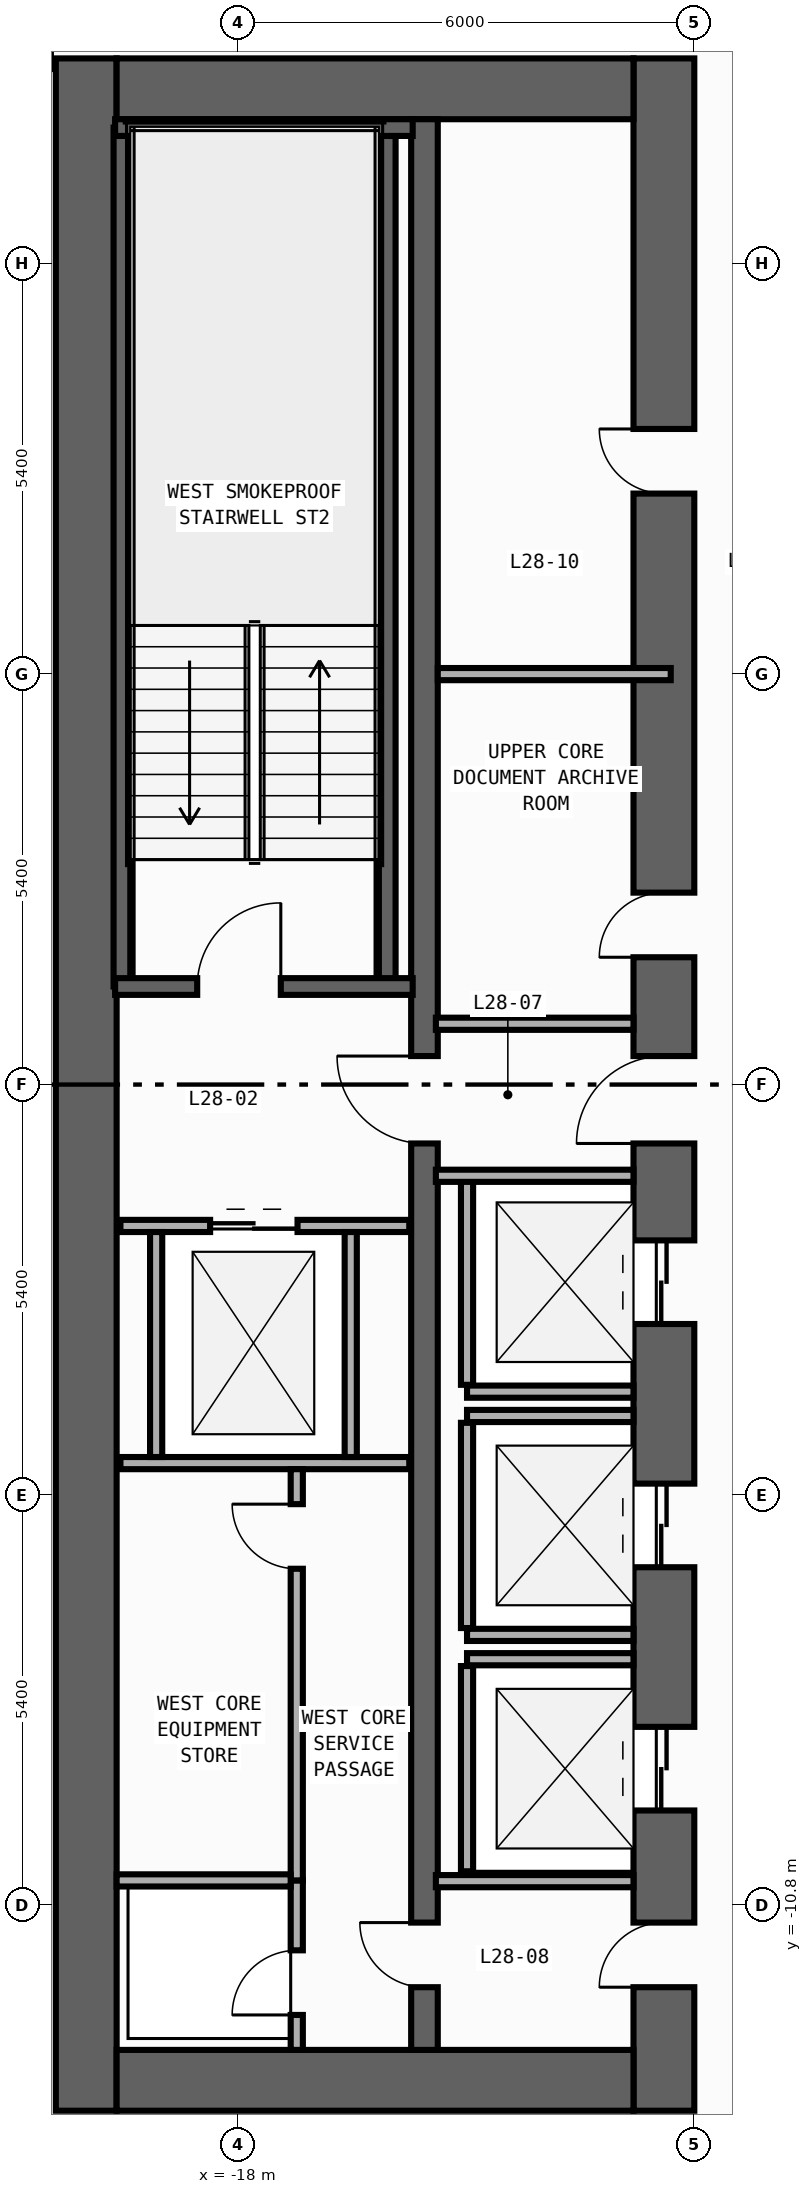
"""IFC4 building model, lengths in metres.
Left out: names, types, materials, properties, quantities, classifications, styles, units other than length and angle.
Written with IfcOpenShell. Run it as: python <this file> out.ifc"""

import sys

from ifc_helpers import new_model, si_unit, direction, frame, frame_2d, origin, place, context, subcontext, project, spatial, rectangle, extrude, element, fill, save


model = new_model("IFC4")
c1 = context("Model", 3, precision=1e-05, world=origin(), true_north=direction((0.0, 1.0)))
c2 = subcontext(c1, "Body", "Model", "MODEL_VIEW")
j1 = project(units=[si_unit("LENGTHUNIT", "METRE"), si_unit("PLANEANGLEUNIT", "RADIAN")], contexts=[c1])
p1 = place(None, origin())
s1 = spatial("IfcSite", under=j1, at=p1, CompositionType="ELEMENT")
p2 = place(p1, origin())
s2 = spatial("IfcBuilding", under=s1, at=p2, CompositionType="ELEMENT")
p3 = place(p2, frame((0.0, 0.0, 122.6)))
s3 = spatial("IfcBuildingStorey", under=s2, at=p3, CompositionType="ELEMENT", Elevation=122.6)
p4 = place(p3, frame((-20.0, -13.5, 0.0), z_axis=(0.0, 0.0, 1.0), x_axis=(0.0, 1.0, 0.0)))
e1 = element("IfcWall", 1, at=p4, inside=s3, PredefinedType="SHEAR", context=c2, shape_type="SweptSolid", body=[
    extrude(rectangle(XDim=27.0, YDim=0.8, at=frame_2d((13.5, 0.0))), origin(), (0.0, 0.0, 1.0), 3.94),
])
p5 = place(p3, frame((-12.4, -13.5, 0.0), z_axis=(0.0, 0.0, 1.0), x_axis=(0.0, 1.0, 0.0)))
e2 = element("IfcWall", 2, at=p5, inside=s3, PredefinedType="SHEAR", context=c2, shape_type="SweptSolid", body=[
    extrude(rectangle(XDim=27.0, YDim=0.8, at=frame_2d((13.5, 0.0))), origin(), (0.0, 0.0, 1.0), 3.94),
])
p6 = place(p5, frame((10.35, 0.0, 0.0)))
e3 = element("IfcOpeningElement", 3, at=p6, cuts=e2, PredefinedType="OPENING", context=c2, shape_type="SweptSolid", body=[
    extrude(rectangle(XDim=1.1, YDim=2.2, at=frame_2d((0.55, 1.1))), frame((0.0, 0.41, 0.0), z_axis=(0.0, -1.0, 0.0), x_axis=(1.0, 0.0, 0.0)), (0.0, 0.0, 1.0), 0.82),
])
p7 = place(p5, frame((7.15, 0.0, 0.0)))
e4 = element("IfcOpeningElement", 4, at=p7, cuts=e2, PredefinedType="OPENING", context=c2, shape_type="SweptSolid", body=[
    extrude(rectangle(XDim=1.1, YDim=2.2, at=frame_2d((0.55, 1.1))), frame((0.0, 0.41, 0.0), z_axis=(0.0, -1.0, 0.0), x_axis=(1.0, 0.0, 0.0)), (0.0, 0.0, 1.0), 0.82),
])
p8 = place(p5, frame((3.95, 0.0, 0.0)))
e5 = element("IfcOpeningElement", 5, at=p8, cuts=e2, PredefinedType="OPENING", context=c2, shape_type="SweptSolid", body=[
    extrude(rectangle(XDim=1.1, YDim=2.2, at=frame_2d((0.55, 1.1))), frame((0.0, 0.41, 0.0), z_axis=(0.0, -1.0, 0.0), x_axis=(1.0, 0.0, 0.0)), (0.0, 0.0, 1.0), 0.82),
])
p9 = place(p5, frame((15.175, 0.0, 0.0)))
e6 = element("IfcOpeningElement", 6, at=p9, cuts=e2, PredefinedType="OPENING", context=c2, shape_type="SweptSolid", body=[
    extrude(rectangle(XDim=0.85, YDim=2.1, at=frame_2d((0.425, 1.05))), frame((0.0, 0.41, 0.0), z_axis=(0.0, -1.0, 0.0), x_axis=(1.0, 0.0, 0.0)), (0.0, 0.0, 1.0), 0.82),
])
p10 = place(p5, frame((21.275, 0.0, 0.0)))
e7 = element("IfcOpeningElement", 7, at=p10, cuts=e2, PredefinedType="OPENING", context=c2, shape_type="SweptSolid", body=[
    extrude(rectangle(XDim=0.85, YDim=2.1, at=frame_2d((0.425, 1.05))), frame((0.0, 0.41, 0.0), z_axis=(0.0, -1.0, 0.0), x_axis=(1.0, 0.0, 0.0)), (0.0, 0.0, 1.0), 0.82),
])
p11 = place(p5, frame((12.725, 0.0, 0.0)))
e8 = element("IfcOpeningElement", 8, at=p11, cuts=e2, PredefinedType="OPENING", context=c2, shape_type="SweptSolid", body=[
    extrude(rectangle(XDim=1.15, YDim=2.2, at=frame_2d((0.575, 1.1))), frame((0.0, 0.41, 0.0), z_axis=(0.0, -1.0, 0.0), x_axis=(1.0, 0.0, 0.0)), (0.0, 0.0, 1.0), 0.82),
])
p12 = place(p5, frame((1.625, 0.0, 0.0)))
e9 = element("IfcOpeningElement", 9, at=p12, cuts=e2, PredefinedType="OPENING", context=c2, shape_type="SweptSolid", body=[
    extrude(rectangle(XDim=0.85, YDim=2.1, at=frame_2d((0.425, 1.05))), frame((0.0, 0.41, 0.0), z_axis=(0.0, -1.0, 0.0), x_axis=(1.0, 0.0, 0.0)), (0.0, 0.0, 1.0), 0.82),
])
for number, where, z_axis, x_axis in (
    (10, (-19.6, -13.1, 0.0), (0.0, 0.0, 1.0), (1.0, 0.0, 0.0)),
    (11, (-19.6, 13.1, 0.0), (0.0, 0.0, 1.0), (1.0, 0.0, 0.0)),
):
    element("IfcWall", number, at=place(p3, frame(where, z_axis=z_axis, x_axis=x_axis)), inside=s3, PredefinedType="SHEAR", context=c2, shape_type="SweptSolid", body=[
        extrude(rectangle(XDim=6.8, YDim=0.8, at=frame_2d((3.4, 0.0))), origin(), (0.0, 0.0, 1.0), 3.94),
    ])
p13 = place(p3, frame((-15.55, -12.7, 0.0), z_axis=(0.0, 0.0, 1.0), x_axis=(0.0, 1.0, 0.0)))
e12 = element("IfcWall", 12, at=p13, inside=s3, PredefinedType="SHEAR", context=c2, shape_type="SweptSolid", body=[
    extrude(rectangle(XDim=25.4, YDim=0.35, at=frame_2d((12.7, 0.0))), origin(), (0.0, 0.0, 1.0), 3.94),
])
p14 = place(p13, frame((11.925, 0.0, 0.0)))
e13 = element("IfcOpeningElement", 13, at=p14, cuts=e12, PredefinedType="OPENING", context=c2, shape_type="SweptSolid", body=[
    extrude(rectangle(XDim=1.15, YDim=2.2, at=frame_2d((0.575, 1.1))), frame((0.0, 0.185, 0.0), z_axis=(0.0, -1.0, 0.0), x_axis=(1.0, 0.0, 0.0)), (0.0, 0.0, 1.0), 0.37),
])
p15 = place(p13, frame((0.825, 0.0, 0.0)))
e14 = element("IfcOpeningElement", 14, at=p15, cuts=e12, PredefinedType="OPENING", context=c2, shape_type="SweptSolid", body=[
    extrude(rectangle(XDim=0.85, YDim=2.1, at=frame_2d((0.425, 1.05))), frame((0.0, 0.185, 0.0), z_axis=(0.0, -1.0, 0.0), x_axis=(1.0, 0.0, 0.0)), (0.0, 0.0, 1.0), 0.37),
])
for number, where, z_axis, x_axis in (
    (15, (-16.04, 1.29, 0.0), (0.0, 0.0, 1.0), (0.0, 1.0, 0.0)),
    (16, (-19.53, 1.29, 0.0), (0.0, 0.0, 1.0), (0.0, 1.0, 0.0)),
):
    element("IfcWall", number, at=place(p3, frame(where, z_axis=z_axis, x_axis=x_axis)), inside=s3, PredefinedType="SHEAR", context=c2, shape_type="SweptSolid", body=[
        extrude(rectangle(XDim=11.3, YDim=0.22, at=frame_2d((5.65, 0.0))), origin(), (0.0, 0.0, 1.0), 3.94),
    ])
p16 = place(p3, frame((-19.62, 12.59, 0.0), z_axis=(0.0, 0.0, 1.0), x_axis=(1.0, 0.0, 0.0)))
e17 = element("IfcWall", 17, at=p16, inside=s3, PredefinedType="SHEAR", context=c2, shape_type="SweptSolid", body=[
    extrude(rectangle(XDim=3.915, YDim=0.22, at=frame_2d((1.958, 0.0))), origin(), (0.0, 0.0, 1.0), 3.94),
])
p17 = place(p3, frame((-19.62, 1.29, 0.0), z_axis=(0.0, 0.0, 1.0), x_axis=(1.0, 0.0, 0.0)))
e18 = element("IfcWall", 18, at=p17, inside=s3, PredefinedType="SHEAR", context=c2, shape_type="SweptSolid", body=[
    extrude(rectangle(XDim=3.915, YDim=0.22, at=frame_2d((1.958, 0.0))), origin(), (0.0, 0.0, 1.0), 3.94),
])
p18 = place(p17, frame((1.08, 0.0, 0.0)))
e19 = element("IfcOpeningElement", 19, at=p18, cuts=e18, PredefinedType="OPENING", context=c2, shape_type="SweptSolid", body=[
    extrude(rectangle(XDim=1.1, YDim=2.2, at=frame_2d((0.55, 1.1))), frame((0.0, 0.12, 0.0), z_axis=(0.0, -1.0, 0.0), x_axis=(1.0, 0.0, 0.0)), (0.0, 0.0, 1.0), 0.24),
])
p19 = place(p3, frame((-14.99, -4.04, 0.0), z_axis=(0.0, 0.0, 1.0), x_axis=(1.0, 0.0, 0.0)))
e20 = element("IfcWall", 20, at=p19, inside=s3, PredefinedType="STANDARD", context=c2, shape_type="SweptSolid", body=[
    extrude(rectangle(XDim=2.19, YDim=0.16, at=frame_2d((1.095, 0.0))), origin(), (0.0, 0.0, 1.0), 3.94),
])
p20 = place(p3, frame((-14.99, -3.95, 0.0), z_axis=(0.0, 0.0, 1.0), x_axis=(0.0, 1.0, 0.0)))
e21 = element("IfcWall", 21, at=p20, inside=s3, PredefinedType="STANDARD", context=c2, shape_type="SweptSolid", body=[
    extrude(rectangle(XDim=2.7, YDim=0.16, at=frame_2d((1.35, 0.0))), origin(), (0.0, 0.0, 1.0), 3.94),
])
for number, where, z_axis, x_axis in (
    (22, (-14.99, -7.24, 0.0), (0.0, 0.0, 1.0), (1.0, 0.0, 0.0)),
    (23, (-14.99, -4.36, 0.0), (0.0, 0.0, 1.0), (1.0, 0.0, 0.0)),
):
    element("IfcWall", number, at=place(p3, frame(where, z_axis=z_axis, x_axis=x_axis)), inside=s3, PredefinedType="STANDARD", context=c2, shape_type="SweptSolid", body=[
        extrude(rectangle(XDim=2.19, YDim=0.16, at=frame_2d((1.095, 0.0))), origin(), (0.0, 0.0, 1.0), 3.94),
    ])
p21 = place(p3, frame((-14.99, -7.15, 0.0), z_axis=(0.0, 0.0, 1.0), x_axis=(0.0, 1.0, 0.0)))
e24 = element("IfcWall", 24, at=p21, inside=s3, PredefinedType="STANDARD", context=c2, shape_type="SweptSolid", body=[
    extrude(rectangle(XDim=2.7, YDim=0.16, at=frame_2d((1.35, 0.0))), origin(), (0.0, 0.0, 1.0), 3.94),
])
p22 = place(p3, frame((-14.99, -7.56, 0.0), z_axis=(0.0, 0.0, 1.0), x_axis=(1.0, 0.0, 0.0)))
e25 = element("IfcWall", 25, at=p22, inside=s3, PredefinedType="STANDARD", context=c2, shape_type="SweptSolid", body=[
    extrude(rectangle(XDim=2.19, YDim=0.16, at=frame_2d((1.095, 0.0))), origin(), (0.0, 0.0, 1.0), 3.94),
])
p23 = place(p3, frame((-14.99, -10.35, 0.0), z_axis=(0.0, 0.0, 1.0), x_axis=(0.0, 1.0, 0.0)))
e26 = element("IfcWall", 26, at=p23, inside=s3, PredefinedType="STANDARD", context=c2, shape_type="SweptSolid", body=[
    extrude(rectangle(XDim=2.7, YDim=0.16, at=frame_2d((1.35, 0.0))), origin(), (0.0, 0.0, 1.0), 3.94),
])
p24 = place(p3, frame((-19.55, -1.86, 0.0), z_axis=(0.0, 0.0, 1.0), x_axis=(1.0, 0.0, 0.0)))
e27 = element("IfcWall", 27, at=p24, inside=s3, PredefinedType="STANDARD", context=c2, shape_type="SweptSolid", body=[
    extrude(rectangle(XDim=3.8, YDim=0.16, at=frame_2d((1.9, 0.0))), origin(), (0.0, 0.0, 1.0), 3.94),
])
p25 = place(p24, frame((1.18, 0.0, 0.0)))
e28 = element("IfcOpeningElement", 28, at=p25, cuts=e27, PredefinedType="OPENING", context=c2, shape_type="SweptSolid", body=[
    extrude(rectangle(XDim=1.15, YDim=2.2, at=frame_2d((0.575, 1.1))), frame((0.0, 0.09, 0.0), z_axis=(0.0, -1.0, 0.0), x_axis=(1.0, 0.0, 0.0)), (0.0, 0.0, 1.0), 0.18),
])
p26 = place(p3, frame((-19.55, -4.98, 0.0), z_axis=(0.0, 0.0, 1.0), x_axis=(1.0, 0.0, 0.0)))
e29 = element("IfcWall", 29, at=p26, inside=s3, PredefinedType="STANDARD", context=c2, shape_type="SweptSolid", body=[
    extrude(rectangle(XDim=3.8, YDim=0.16, at=frame_2d((1.9, 0.0))), origin(), (0.0, 0.0, 1.0), 3.94),
])
for number, where, z_axis, x_axis in (
    (30, (-19.08, -4.9, 0.0), (0.0, 0.0, 1.0), (0.0, 1.0, 0.0)),
    (31, (-16.52, -4.9, 0.0), (0.0, 0.0, 1.0), (0.0, 1.0, 0.0)),
):
    element("IfcWall", number, at=place(p3, frame(where, z_axis=z_axis, x_axis=x_axis)), inside=s3, PredefinedType="STANDARD", context=c2, shape_type="SweptSolid", body=[
        extrude(rectangle(XDim=2.96, YDim=0.16, at=frame_2d((1.48, 0.0))), origin(), (0.0, 0.0, 1.0), 3.94),
    ])
for number, where, z_axis, x_axis in (
    (32, (-15.4, 0.8, 0.0), (0.0, 0.0, 1.0), (1.0, 0.0, 0.0)),
    (33, (-15.4, -1.2, 0.0), (0.0, 0.0, 1.0), (1.0, 0.0, 0.0)),
    (34, (-15.4, -10.48, 0.0), (0.0, 0.0, 1.0), (1.0, 0.0, 0.0)),
):
    element("IfcWall", number, at=place(p3, frame(where, z_axis=z_axis, x_axis=x_axis)), inside=s3, PredefinedType="STANDARD", context=c2, shape_type="SweptSolid", body=[
        extrude(rectangle(XDim=2.6, YDim=0.16, at=frame_2d((1.3, 0.0))), origin(), (0.0, 0.0, 1.0), 3.94),
    ])
p27 = place(p3, frame((-17.23, -12.7, 0.0), z_axis=(0.0, 0.0, 1.0), x_axis=(0.0, 1.0, 0.0)))
e35 = element("IfcWall", 35, at=p27, inside=s3, PredefinedType="PARTITIONING", context=c2, shape_type="SweptSolid", body=[
    extrude(rectangle(XDim=2.23, YDim=0.16, at=frame_2d((1.115, 0.0))), origin(), (0.0, 0.0, 1.0), 3.94),
])
p28 = place(p27, frame((0.46, 0.0, 0.0)))
e36 = element("IfcOpeningElement", 36, at=p28, cuts=e35, PredefinedType="OPENING", context=c2, shape_type="SweptSolid", body=[
    extrude(rectangle(XDim=0.85, YDim=2.1, at=frame_2d((0.425, 1.05))), frame((0.0, 0.09, 0.0), z_axis=(0.0, -1.0, 0.0), x_axis=(1.0, 0.0, 0.0)), (0.0, 0.0, 1.0), 0.18),
])
p29 = place(p3, frame((-17.23, -10.47, 0.0), z_axis=(0.0, 0.0, 1.0), x_axis=(0.0, 1.0, 0.0)))
e37 = element("IfcWall", 37, at=p29, inside=s3, PredefinedType="PARTITIONING", context=c2, shape_type="SweptSolid", body=[
    extrude(rectangle(XDim=5.41, YDim=0.16, at=frame_2d((2.705, 0.0))), origin(), (0.0, 0.0, 1.0), 3.94),
])
p30 = place(p29, frame((4.1, 0.0, 0.0)))
e38 = element("IfcOpeningElement", 38, at=p30, cuts=e37, PredefinedType="OPENING", context=c2, shape_type="SweptSolid", body=[
    extrude(rectangle(XDim=0.85, YDim=2.1, at=frame_2d((0.425, 1.05))), frame((0.0, 0.09, 0.0), z_axis=(0.0, -1.0, 0.0), x_axis=(1.0, 0.0, 0.0)), (0.0, 0.0, 1.0), 0.18),
])
p31 = place(p3, frame((-19.6, -10.47, 0.0), z_axis=(0.0, 0.0, 1.0), x_axis=(1.0, 0.0, 0.0)))
e39 = element("IfcWall", 39, at=p31, inside=s3, PredefinedType="PARTITIONING", context=c2, shape_type="SweptSolid", body=[
    extrude(rectangle(XDim=2.29, YDim=0.16, at=frame_2d((1.145, 0.0))), origin(), (0.0, 0.0, 1.0), 3.94),
])
p32 = place(p3, frame((-15.375, 5.4, 0.0), z_axis=(0.0, 0.0, 1.0), x_axis=(1.0, 0.0, 0.0)))
e40 = element("IfcWall", 40, at=p32, inside=s3, PredefinedType="PARTITIONING", context=c2, shape_type="SweptSolid", body=[
    extrude(rectangle(XDim=3.065, YDim=0.16, at=frame_2d((1.532, 0.0))), origin(), (0.0, 0.0, 1.0), 3.94),
])
p33 = place(p18, origin())
e41 = element("IfcDoor", 41, at=p33, inside=s3, OperationType="SINGLE_SWING_RIGHT", PredefinedType="DOOR", context=c2, shape_type="SweptSolid", body=[
    extrude(rectangle(XDim=1.1, YDim=2.2, at=frame_2d((0.55, 1.1))), frame((0.0, 0.025, 0.0), z_axis=(0.0, -1.0, 0.0), x_axis=(1.0, 0.0, 0.0)), (0.0, 0.0, 1.0), 0.05),
])
fill(e19, e41)
p34 = place(p6, origin())
e42 = element("IfcDoor", 42, at=p34, inside=s3, OperationType="DOUBLE_DOOR_SLIDING", PredefinedType="DOOR", context=c2, shape_type="SweptSolid", body=[
    extrude(rectangle(XDim=1.1, YDim=2.2, at=frame_2d((0.55, 1.1))), frame((0.0, 0.025, 0.0), z_axis=(0.0, -1.0, 0.0), x_axis=(1.0, 0.0, 0.0)), (0.0, 0.0, 1.0), 0.05),
])
fill(e3, e42)
p35 = place(p7, origin())
e43 = element("IfcDoor", 43, at=p35, inside=s3, OperationType="DOUBLE_DOOR_SLIDING", PredefinedType="DOOR", context=c2, shape_type="SweptSolid", body=[
    extrude(rectangle(XDim=1.1, YDim=2.2, at=frame_2d((0.55, 1.1))), frame((0.0, 0.025, 0.0), z_axis=(0.0, -1.0, 0.0), x_axis=(1.0, 0.0, 0.0)), (0.0, 0.0, 1.0), 0.05),
])
fill(e4, e43)
p36 = place(p8, origin())
e44 = element("IfcDoor", 44, at=p36, inside=s3, OperationType="DOUBLE_DOOR_SLIDING", PredefinedType="DOOR", context=c2, shape_type="SweptSolid", body=[
    extrude(rectangle(XDim=1.1, YDim=2.2, at=frame_2d((0.55, 1.1))), frame((0.0, 0.025, 0.0), z_axis=(0.0, -1.0, 0.0), x_axis=(1.0, 0.0, 0.0)), (0.0, 0.0, 1.0), 0.05),
])
fill(e5, e44)
p37 = place(p9, origin())
e45 = element("IfcDoor", 45, at=p37, inside=s3, OperationType="SINGLE_SWING_LEFT", PredefinedType="DOOR", context=c2, shape_type="SweptSolid", body=[
    extrude(rectangle(XDim=0.85, YDim=2.1, at=frame_2d((0.425, 1.05))), frame((0.0, 0.025, 0.0), z_axis=(0.0, -1.0, 0.0), x_axis=(1.0, 0.0, 0.0)), (0.0, 0.0, 1.0), 0.05),
])
fill(e6, e45)
p38 = place(p10, origin())
e46 = element("IfcDoor", 46, at=p38, inside=s3, OperationType="SINGLE_SWING_RIGHT", PredefinedType="DOOR", context=c2, shape_type="SweptSolid", body=[
    extrude(rectangle(XDim=0.85, YDim=2.1, at=frame_2d((0.425, 1.05))), frame((0.0, 0.025, 0.0), z_axis=(0.0, -1.0, 0.0), x_axis=(1.0, 0.0, 0.0)), (0.0, 0.0, 1.0), 0.05),
])
fill(e7, e46)
p39 = place(p11, origin())
e47 = element("IfcDoor", 47, at=p39, inside=s3, OperationType="SINGLE_SWING_LEFT", PredefinedType="DOOR", context=c2, shape_type="SweptSolid", body=[
    extrude(rectangle(XDim=1.15, YDim=2.2, at=frame_2d((0.575, 1.1))), frame((0.0, 0.025, 0.0), z_axis=(0.0, -1.0, 0.0), x_axis=(1.0, 0.0, 0.0)), (0.0, 0.0, 1.0), 0.05),
])
fill(e8, e47)
p40 = place(p14, origin())
e48 = element("IfcDoor", 48, at=p40, inside=s3, OperationType="SINGLE_SWING_RIGHT", PredefinedType="DOOR", context=c2, shape_type="SweptSolid", body=[
    extrude(rectangle(XDim=1.15, YDim=2.2, at=frame_2d((0.575, 1.1))), frame((0.0, 0.025, 0.0), z_axis=(0.0, -1.0, 0.0), x_axis=(1.0, 0.0, 0.0)), (0.0, 0.0, 1.0), 0.05),
])
fill(e13, e48)
p41 = place(p12, origin())
e49 = element("IfcDoor", 49, at=p41, inside=s3, OperationType="SINGLE_SWING_LEFT", PredefinedType="DOOR", context=c2, shape_type="SweptSolid", body=[
    extrude(rectangle(XDim=0.85, YDim=2.1, at=frame_2d((0.425, 1.05))), frame((0.0, 0.025, 0.0), z_axis=(0.0, -1.0, 0.0), x_axis=(1.0, 0.0, 0.0)), (0.0, 0.0, 1.0), 0.05),
])
fill(e9, e49)
p42 = place(p15, origin())
e50 = element("IfcDoor", 50, at=p42, inside=s3, OperationType="SINGLE_SWING_RIGHT", PredefinedType="DOOR", context=c2, shape_type="SweptSolid", body=[
    extrude(rectangle(XDim=0.85, YDim=2.1, at=frame_2d((0.425, 1.05))), frame((0.0, 0.025, 0.0), z_axis=(0.0, -1.0, 0.0), x_axis=(1.0, 0.0, 0.0)), (0.0, 0.0, 1.0), 0.05),
])
fill(e14, e50)
p43 = place(p25, origin())
e51 = element("IfcDoor", 51, at=p43, inside=s3, OperationType="DOUBLE_DOOR_SLIDING", PredefinedType="DOOR", context=c2, shape_type="SweptSolid", body=[
    extrude(rectangle(XDim=1.15, YDim=2.2, at=frame_2d((0.575, 1.1))), frame((0.0, 0.025, 0.0), z_axis=(0.0, -1.0, 0.0), x_axis=(1.0, 0.0, 0.0)), (0.0, 0.0, 1.0), 0.05),
])
fill(e28, e51)
p44 = place(p28, origin())
e52 = element("IfcDoor", 52, at=p44, inside=s3, OperationType="SINGLE_SWING_LEFT", PredefinedType="DOOR", context=c2, shape_type="SweptSolid", body=[
    extrude(rectangle(XDim=0.85, YDim=2.1, at=frame_2d((0.425, 1.05))), frame((0.0, 0.025, 0.0), z_axis=(0.0, -1.0, 0.0), x_axis=(1.0, 0.0, 0.0)), (0.0, 0.0, 1.0), 0.05),
])
fill(e36, e52)
p45 = place(p30, origin())
e53 = element("IfcDoor", 53, at=p45, inside=s3, OperationType="SINGLE_SWING_RIGHT", PredefinedType="DOOR", context=c2, shape_type="SweptSolid", body=[
    extrude(rectangle(XDim=0.85, YDim=2.1, at=frame_2d((0.425, 1.05))), frame((0.0, 0.025, 0.0), z_axis=(0.0, -1.0, 0.0), x_axis=(1.0, 0.0, 0.0)), (0.0, 0.0, 1.0), 0.05),
])
fill(e38, e53)
save(model, sys.argv[1])
